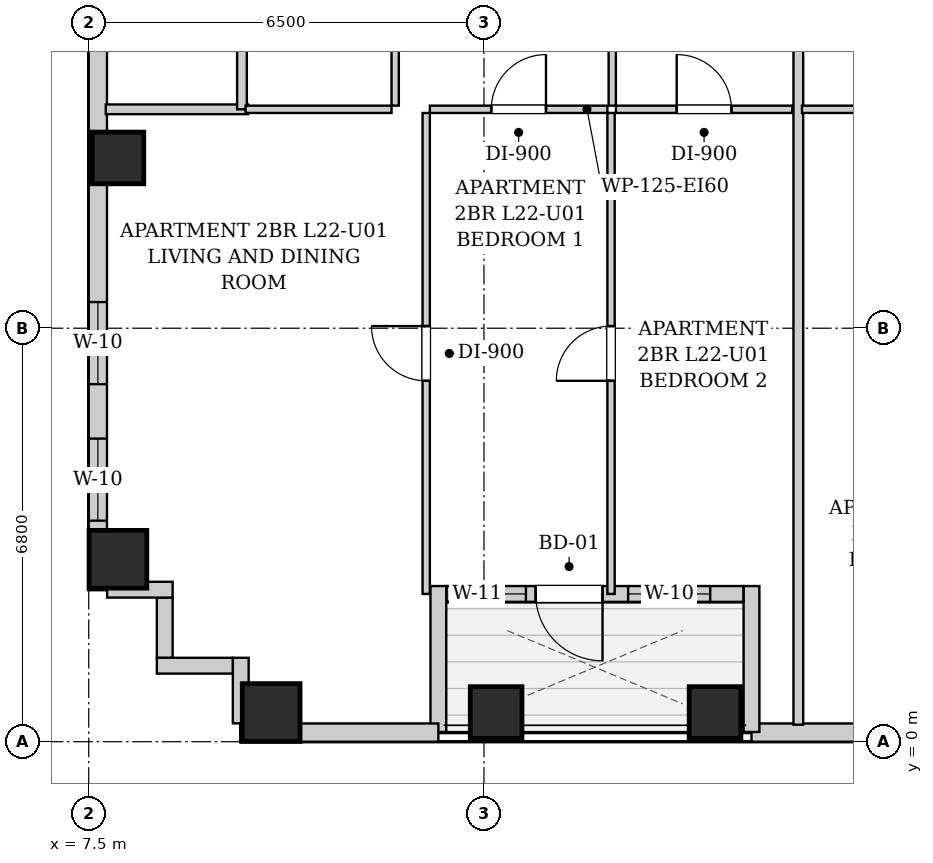
"""IFC4 building model, lengths in metres.
Left out: names, types, materials, properties, quantities, classifications, styles, units other than length and angle.
Written with IfcOpenShell. Run it as: python <this file> out.ifc"""

import sys

from ifc_helpers import new_model, si_unit, direction, frame, frame_2d, origin, origin_2d, place, context, subcontext, project, spatial, rectangle, extrude, element, fill, save


model = new_model("IFC4")
c1 = context("Model", 3, precision=1e-05, world=origin(), true_north=direction((0.0, 1.0)))
c2 = subcontext(c1, "Body", "Model", "MODEL_VIEW")
j1 = project(units=[si_unit("LENGTHUNIT", "METRE"), si_unit("PLANEANGLEUNIT", "RADIAN")], contexts=[c1])
p1 = place(None, origin())
s1 = spatial("IfcSite", under=j1, at=p1, CompositionType="ELEMENT")
p2 = place(p1, origin())
s2 = spatial("IfcBuilding", under=s1, at=p2, CompositionType="ELEMENT")
p3 = place(p2, frame((0.0, 0.0, 81.5)))
s3 = spatial("IfcBuildingStorey", under=s2, at=p3, CompositionType="ELEMENT", Elevation=81.5)
p4 = place(p3, frame((10.5, 0.48, 0.0), z_axis=(0.0, 0.0, 1.0), x_axis=(1.0, 0.0, 0.0)))
e1 = element("IfcColumn", 1, at=p4, inside=s3, PredefinedType="COLUMN", context=c2, shape_type="SweptSolid", body=[
    extrude(rectangle(XDim=0.95, YDim=0.95, at=origin_2d()), origin(), (0.0, 0.0, 1.0), 3.2),
])
for number, where, z_axis, x_axis in (
    (2, (14.2, 0.48, 0.0), (0.0, 0.0, 1.0), (1.0, 0.0, 0.0)),
    (3, (17.8, 0.48, 0.0), (0.0, 0.0, 1.0), (1.0, 0.0, 0.0)),
):
    element("IfcColumn", number, at=place(p3, frame(where, z_axis=z_axis, x_axis=x_axis)), inside=s3, PredefinedType="COLUMN", context=c2, shape_type="SweptSolid", body=[
        extrude(rectangle(XDim=0.85, YDim=0.85, at=origin_2d()), origin(), (0.0, 0.0, 1.0), 3.2),
    ])
p5 = place(p3, frame((7.98, 3.0, 0.0), z_axis=(0.0, 0.0, 1.0), x_axis=(1.0, 0.0, 0.0)))
e4 = element("IfcColumn", 4, at=p5, inside=s3, PredefinedType="COLUMN", context=c2, shape_type="SweptSolid", body=[
    extrude(rectangle(XDim=0.95, YDim=0.95, at=origin_2d()), origin(), (0.0, 0.0, 1.0), 3.2),
])
p6 = place(p3, frame((7.98, 9.6, 0.0), z_axis=(0.0, 0.0, 1.0), x_axis=(1.0, 0.0, 0.0)))
e5 = element("IfcColumn", 5, at=p6, inside=s3, PredefinedType="COLUMN", context=c2, shape_type="SweptSolid", body=[
    extrude(rectangle(XDim=0.85, YDim=0.85, at=origin_2d()), origin(), (0.0, 0.0, 1.0), 3.2),
])
p7 = place(p3, frame((40.9, 0.15, 0.0), z_axis=(0.0, 0.0, 1.0), x_axis=(-1.0, 0.0, 0.0)))
e6 = element("IfcWall", 6, at=p7, inside=s3, PredefinedType="SOLIDWALL", context=c2, shape_type="SweptSolid", body=[
    extrude(rectangle(XDim=22.5, YDim=0.3, at=frame_2d((11.25, 0.0))), origin(), (0.0, 0.0, 1.0), 2.94),
])
p8 = place(p7, frame((19.425, 0.0, 0.55)))
e7 = element("IfcOpeningElement", 7, at=p8, cuts=e6, PredefinedType="OPENING", context=c2, shape_type="SweptSolid", body=[
    extrude(rectangle(XDim=1.35, YDim=1.2, at=frame_2d((0.675, 0.6))), frame((0.0, 0.16, 0.0), z_axis=(0.0, -1.0, 0.0), x_axis=(1.0, 0.0, 0.0)), (0.0, 0.0, 1.0), 0.32),
])
p9 = place(p7, frame((12.55, 0.0, 0.55)))
e8 = element("IfcOpeningElement", 8, at=p9, cuts=e6, PredefinedType="OPENING", context=c2, shape_type="SweptSolid", body=[
    extrude(rectangle(XDim=0.85, YDim=1.2, at=frame_2d((0.425, 0.6))), frame((0.0, 0.16, 0.0), z_axis=(0.0, -1.0, 0.0), x_axis=(1.0, 0.0, 0.0)), (0.0, 0.0, 1.0), 0.32),
])
p10 = place(p7, frame((9.75, 0.0, 0.55)))
e9 = element("IfcOpeningElement", 9, at=p10, cuts=e6, PredefinedType="OPENING", context=c2, shape_type="SweptSolid", body=[
    extrude(rectangle(XDim=1.35, YDim=1.2, at=frame_2d((0.675, 0.6))), frame((0.0, 0.16, 0.0), z_axis=(0.0, -1.0, 0.0), x_axis=(1.0, 0.0, 0.0)), (0.0, 0.0, 1.0), 0.32),
])
p11 = place(p7, frame((6.265, 0.0, 0.55)))
e10 = element("IfcOpeningElement", 10, at=p11, cuts=e6, PredefinedType="OPENING", context=c2, shape_type="SweptSolid", body=[
    extrude(rectangle(XDim=0.85, YDim=1.2, at=frame_2d((0.425, 0.6))), frame((0.0, 0.16, 0.0), z_axis=(0.0, -1.0, 0.0), x_axis=(1.0, 0.0, 0.0)), (0.0, 0.0, 1.0), 0.32),
])
p12 = place(p7, frame((2.325, 0.0, 0.55)))
e11 = element("IfcOpeningElement", 11, at=p12, cuts=e6, PredefinedType="OPENING", context=c2, shape_type="SweptSolid", body=[
    extrude(rectangle(XDim=1.35, YDim=1.2, at=frame_2d((0.675, 0.6))), frame((0.0, 0.16, 0.0), z_axis=(0.0, -1.0, 0.0), x_axis=(1.0, 0.0, 0.0)), (0.0, 0.0, 1.0), 0.32),
])
p13 = place(p3, frame((18.4, 0.16, 0.0), z_axis=(0.0, 0.0, 1.0), x_axis=(0.0, 1.0, 0.0)))
e12 = element("IfcWall", 12, at=p13, inside=s3, PredefinedType="SOLIDWALL", context=c2, shape_type="SweptSolid", body=[
    extrude(rectangle(XDim=2.4, YDim=0.26, at=frame_2d((1.2, 0.0))), origin(), (0.0, 0.0, 1.0), 2.94),
])
p14 = place(p3, frame((18.266, 2.43, 0.0), z_axis=(0.0, 0.0, 1.0), x_axis=(-1.0, 0.0, 0.0)))
e13 = element("IfcWall", 13, at=p14, inside=s3, PredefinedType="SOLIDWALL", context=c2, shape_type="SweptSolid", body=[
    extrude(rectangle(XDim=4.882, YDim=0.26, at=frame_2d((2.441, 0.0))), origin(), (0.0, 0.0, 1.0), 2.94),
])
p15 = place(p14, frame((2.316, 0.0, 0.0)))
e14 = element("IfcOpeningElement", 14, at=p15, cuts=e13, PredefinedType="OPENING", context=c2, shape_type="SweptSolid", body=[
    extrude(rectangle(XDim=1.1, YDim=2.0, at=frame_2d((0.55, 1.0))), frame((0.0, 0.14, 0.0), z_axis=(0.0, -1.0, 0.0), x_axis=(1.0, 0.0, 0.0)), (0.0, 0.0, 1.0), 0.28),
])
p16 = place(p14, frame((3.576, 0.0, 0.55)))
e15 = element("IfcOpeningElement", 15, at=p16, cuts=e13, PredefinedType="OPENING", context=c2, shape_type="SweptSolid", body=[
    extrude(rectangle(XDim=0.85, YDim=1.2, at=frame_2d((0.425, 0.6))), frame((0.0, 0.14, 0.0), z_axis=(0.0, -1.0, 0.0), x_axis=(1.0, 0.0, 0.0)), (0.0, 0.0, 1.0), 0.28),
])
p17 = place(p14, frame((0.545, 0.0, 0.55)))
e16 = element("IfcOpeningElement", 16, at=p17, cuts=e13, PredefinedType="OPENING", context=c2, shape_type="SweptSolid", body=[
    extrude(rectangle(XDim=1.35, YDim=1.2, at=frame_2d((0.675, 0.6))), frame((0.0, 0.14, 0.0), z_axis=(0.0, -1.0, 0.0), x_axis=(1.0, 0.0, 0.0)), (0.0, 0.0, 1.0), 0.28),
])
p18 = place(p3, frame((13.25, 2.56, 0.0), z_axis=(0.0, 0.0, 1.0), x_axis=(0.0, -1.0, 0.0)))
e17 = element("IfcWall", 17, at=p18, inside=s3, PredefinedType="SOLIDWALL", context=c2, shape_type="SweptSolid", body=[
    extrude(rectangle(XDim=2.4, YDim=0.26, at=frame_2d((1.2, 0.0))), origin(), (0.0, 0.0, 1.0), 2.94),
])
p19 = place(p3, frame((13.25, 0.15, 0.0), z_axis=(0.0, 0.0, 1.0), x_axis=(-1.0, 0.0, 0.0)))
e18 = element("IfcWall", 18, at=p19, inside=s3, PredefinedType="SOLIDWALL", context=c2, shape_type="SweptSolid", body=[
    extrude(rectangle(XDim=3.25, YDim=0.3, at=frame_2d((1.625, 0.0))), origin(), (0.0, 0.0, 1.0), 2.94),
])
p20 = place(p3, frame((7.65, 2.5, 0.0), z_axis=(0.0, 0.0, 1.0), x_axis=(0.0, 1.0, 0.0)))
e19 = element("IfcWall", 19, at=p20, inside=s3, PredefinedType="SOLIDWALL", context=c2, shape_type="SweptSolid", body=[
    extrude(rectangle(XDim=38.3, YDim=0.3, at=frame_2d((19.15, 0.0))), origin(), (0.0, 0.0, 1.0), 2.94),
])
p21 = place(p20, frame((3.38, 0.0, 0.55)))
e20 = element("IfcOpeningElement", 20, at=p21, cuts=e19, PredefinedType="OPENING", context=c2, shape_type="SweptSolid", body=[
    extrude(rectangle(XDim=1.35, YDim=1.2, at=frame_2d((0.675, 0.6))), frame((0.0, 0.16, 0.0), z_axis=(0.0, -1.0, 0.0), x_axis=(1.0, 0.0, 0.0)), (0.0, 0.0, 1.0), 0.32),
])
p22 = place(p20, frame((1.135, 0.0, 0.55)))
e21 = element("IfcOpeningElement", 21, at=p22, cuts=e19, PredefinedType="OPENING", context=c2, shape_type="SweptSolid", body=[
    extrude(rectangle(XDim=1.35, YDim=1.2, at=frame_2d((0.675, 0.6))), frame((0.0, 0.16, 0.0), z_axis=(0.0, -1.0, 0.0), x_axis=(1.0, 0.0, 0.0)), (0.0, 0.0, 1.0), 0.32),
])
p23 = place(p20, frame((33.946, 0.0, 0.55)))
e22 = element("IfcOpeningElement", 22, at=p23, cuts=e19, PredefinedType="OPENING", context=c2, shape_type="SweptSolid", body=[
    extrude(rectangle(XDim=1.35, YDim=1.2, at=frame_2d((0.675, 0.6))), frame((0.0, 0.16, 0.0), z_axis=(0.0, -1.0, 0.0), x_axis=(1.0, 0.0, 0.0)), (0.0, 0.0, 1.0), 0.32),
])
p24 = place(p20, frame((32.085, 0.0, 0.55)))
e23 = element("IfcOpeningElement", 23, at=p24, cuts=e19, PredefinedType="OPENING", context=c2, shape_type="SweptSolid", body=[
    extrude(rectangle(XDim=1.35, YDim=1.2, at=frame_2d((0.675, 0.6))), frame((0.0, 0.16, 0.0), z_axis=(0.0, -1.0, 0.0), x_axis=(1.0, 0.0, 0.0)), (0.0, 0.0, 1.0), 0.32),
])
p25 = place(p20, frame((14.194, 0.0, 0.55)))
e24 = element("IfcOpeningElement", 24, at=p25, cuts=e19, PredefinedType="OPENING", context=c2, shape_type="SweptSolid", body=[
    extrude(rectangle(XDim=1.35, YDim=1.2, at=frame_2d((0.675, 0.6))), frame((0.0, 0.16, 0.0), z_axis=(0.0, -1.0, 0.0), x_axis=(1.0, 0.0, 0.0)), (0.0, 0.0, 1.0), 0.32),
])
p26 = place(p20, frame((23.582, 0.0, 0.55)))
e25 = element("IfcOpeningElement", 25, at=p26, cuts=e19, PredefinedType="OPENING", context=c2, shape_type="SweptSolid", body=[
    extrude(rectangle(XDim=1.35, YDim=1.2, at=frame_2d((0.675, 0.6))), frame((0.0, 0.16, 0.0), z_axis=(0.0, -1.0, 0.0), x_axis=(1.0, 0.0, 0.0)), (0.0, 0.0, 1.0), 0.32),
])
p27 = place(p3, frame((10.0, 0.302, 0.0), z_axis=(0.0, 0.0, 1.0), x_axis=(0.0, 1.0, 0.0)))
e26 = element("IfcWall", 26, at=p27, inside=s3, PredefinedType="SOLIDWALL", context=c2, shape_type="SweptSolid", body=[
    extrude(rectangle(XDim=1.078, YDim=0.26, at=frame_2d((0.539, 0.0))), origin(), (0.0, 0.0, 1.0), 2.94),
])
p28 = place(p3, frame((9.868, 1.25, 0.0), z_axis=(0.0, 0.0, 1.0), x_axis=(-1.0, 0.0, 0.0)))
e27 = element("IfcWall", 27, at=p28, inside=s3, PredefinedType="SOLIDWALL", context=c2, shape_type="SweptSolid", body=[
    extrude(rectangle(XDim=1.248, YDim=0.26, at=frame_2d((0.624, 0.0))), origin(), (0.0, 0.0, 1.0), 2.94),
])
p29 = place(p3, frame((8.75, 1.382, 0.0), z_axis=(0.0, 0.0, 1.0), x_axis=(0.0, 1.0, 0.0)))
e28 = element("IfcWall", 28, at=p29, inside=s3, PredefinedType="SOLIDWALL", context=c2, shape_type="SweptSolid", body=[
    extrude(rectangle(XDim=0.986, YDim=0.26, at=frame_2d((0.493, 0.0))), origin(), (0.0, 0.0, 1.0), 2.94),
])
p30 = place(p3, frame((8.88, 2.5, 0.0), z_axis=(0.0, 0.0, 1.0), x_axis=(-1.0, 0.0, 0.0)))
e29 = element("IfcWall", 29, at=p30, inside=s3, PredefinedType="SOLIDWALL", context=c2, shape_type="SweptSolid", body=[
    extrude(rectangle(XDim=1.078, YDim=0.26, at=frame_2d((0.539, 0.0))), origin(), (0.0, 0.0, 1.0), 2.94),
])
p31 = place(p3, frame((7.78, 10.4, 0.0), z_axis=(0.0, 0.0, 1.0), x_axis=(1.0, 0.0, 0.0)))
e30 = element("IfcWall", 30, at=p31, inside=s3, PredefinedType="PARTITIONING", context=c2, shape_type="SweptSolid", body=[
    extrude(rectangle(XDim=2.34, YDim=0.16, at=frame_2d((1.17, 0.0))), origin(), (0.0, 0.0, 1.0), 2.94),
])
p32 = place(p3, frame((10.02, 10.4, 0.0), z_axis=(0.0, 0.0, 1.0), x_axis=(0.0, 1.0, 0.0)))
e31 = element("IfcWall", 31, at=p32, inside=s3, PredefinedType="PARTITIONING", context=c2, shape_type="SweptSolid", body=[
    extrude(rectangle(XDim=2.91, YDim=0.16, at=frame_2d((1.455, 0.0))), origin(), (0.0, 0.0, 1.0), 2.94),
])
p33 = place(p3, frame((12.54, 10.46, 0.0), z_axis=(0.0, 0.0, 1.0), x_axis=(0.0, 1.0, 0.0)))
e32 = element("IfcWall", 32, at=p33, inside=s3, PredefinedType="PARTITIONING", context=c2, shape_type="SweptSolid", body=[
    extrude(rectangle(XDim=2.85, YDim=0.12, at=frame_2d((1.425, 0.0))), origin(), (0.0, 0.0, 1.0), 2.94),
])
p34 = place(p33, frame((0.995, 0.0, 0.0)))
e33 = element("IfcOpeningElement", 33, at=p34, cuts=e32, PredefinedType="OPENING", context=c2, shape_type="SweptSolid", body=[
    extrude(rectangle(XDim=0.86, YDim=2.05, at=frame_2d((0.43, 1.025))), frame((0.0, 0.07, 0.0), z_axis=(0.0, -1.0, 0.0), x_axis=(1.0, 0.0, 0.0)), (0.0, 0.0, 1.0), 0.14),
])
p35 = place(p3, frame((10.08, 10.4, 0.0), z_axis=(0.0, 0.0, 1.0), x_axis=(1.0, 0.0, 0.0)))
e34 = element("IfcWall", 34, at=p35, inside=s3, PredefinedType="PARTITIONING", context=c2, shape_type="SweptSolid", body=[
    extrude(rectangle(XDim=2.4, YDim=0.12, at=frame_2d((1.2, 0.0))), origin(), (0.0, 0.0, 1.0), 2.94),
])
p36 = place(p3, frame((16.11, 10.46, 0.0), z_axis=(0.0, 0.0, 1.0), x_axis=(0.0, 1.0, 0.0)))
e35 = element("IfcWall", 35, at=p36, inside=s3, PredefinedType="PARTITIONING", context=c2, shape_type="SweptSolid", body=[
    extrude(rectangle(XDim=2.85, YDim=0.12, at=frame_2d((1.425, 0.0))), origin(), (0.0, 0.0, 1.0), 2.94),
])
p37 = place(p36, frame((0.975, 0.0, 0.0)))
e36 = element("IfcOpeningElement", 36, at=p37, cuts=e35, PredefinedType="OPENING", context=c2, shape_type="SweptSolid", body=[
    extrude(rectangle(XDim=0.9, YDim=2.05, at=frame_2d((0.45, 1.025))), frame((0.0, 0.07, 0.0), z_axis=(0.0, -1.0, 0.0), x_axis=(1.0, 0.0, 0.0)), (0.0, 0.0, 1.0), 0.14),
])
p38 = place(p3, frame((13.11, 10.4, 0.0), z_axis=(0.0, 0.0, 1.0), x_axis=(1.0, 0.0, 0.0)))
e37 = element("IfcWall", 37, at=p38, inside=s3, PredefinedType="PARTITIONING", context=c2, shape_type="SweptSolid", body=[
    extrude(rectangle(XDim=2.92, YDim=0.12, at=frame_2d((1.46, 0.0))), origin(), (0.0, 0.0, 1.0), 2.94),
])
p39 = place(p38, frame((1.01, 0.0, 0.0)))
e38 = element("IfcOpeningElement", 38, at=p39, cuts=e37, PredefinedType="OPENING", context=c2, shape_type="SweptSolid", body=[
    extrude(rectangle(XDim=0.9, YDim=2.05, at=frame_2d((0.45, 1.025))), frame((0.0, 0.07, 0.0), z_axis=(0.0, -1.0, 0.0), x_axis=(1.0, 0.0, 0.0)), (0.0, 0.0, 1.0), 0.14),
])
p40 = place(p3, frame((16.17, 10.4, 0.0), z_axis=(0.0, 0.0, 1.0), x_axis=(1.0, 0.0, 0.0)))
e39 = element("IfcWall", 39, at=p40, inside=s3, PredefinedType="PARTITIONING", context=c2, shape_type="SweptSolid", body=[
    extrude(rectangle(XDim=2.9, YDim=0.12, at=frame_2d((1.45, 0.0))), origin(), (0.0, 0.0, 1.0), 2.94),
])
p41 = place(p40, frame((1.0, 0.0, 0.0)))
e40 = element("IfcOpeningElement", 40, at=p41, cuts=e39, PredefinedType="OPENING", context=c2, shape_type="SweptSolid", body=[
    extrude(rectangle(XDim=0.9, YDim=2.05, at=frame_2d((0.45, 1.025))), frame((0.0, 0.07, 0.0), z_axis=(0.0, -1.0, 0.0), x_axis=(1.0, 0.0, 0.0)), (0.0, 0.0, 1.0), 0.14),
])
p42 = place(p3, frame((13.05, 2.43, 0.0), z_axis=(0.0, 0.0, 1.0), x_axis=(0.0, 1.0, 0.0)))
e41 = element("IfcWall", 41, at=p42, inside=s3, PredefinedType="PARTITIONING", context=c2, shape_type="SweptSolid", body=[
    extrude(rectangle(XDim=7.91, YDim=0.12, at=frame_2d((3.955, 0.0))), origin(), (0.0, 0.0, 1.0), 2.94),
])
p43 = place(p42, frame((3.505, 0.0, 0.0)))
e42 = element("IfcOpeningElement", 42, at=p43, cuts=e41, PredefinedType="OPENING", context=c2, shape_type="SweptSolid", body=[
    extrude(rectangle(XDim=0.9, YDim=2.05, at=frame_2d((0.45, 1.025))), frame((0.0, 0.07, 0.0), z_axis=(0.0, -1.0, 0.0), x_axis=(1.0, 0.0, 0.0)), (0.0, 0.0, 1.0), 0.14),
])
p44 = place(p3, frame((16.09, 2.43, 0.0), z_axis=(0.0, 0.0, 1.0), x_axis=(0.0, 1.0, 0.0)))
e43 = element("IfcWall", 43, at=p44, inside=s3, PredefinedType="PARTITIONING", context=c2, shape_type="SweptSolid", body=[
    extrude(rectangle(XDim=7.91, YDim=0.12, at=frame_2d((3.955, 0.0))), origin(), (0.0, 0.0, 1.0), 2.94),
])
p45 = place(p44, frame((3.505, 0.0, 0.0)))
e44 = element("IfcOpeningElement", 44, at=p45, cuts=e43, PredefinedType="OPENING", context=c2, shape_type="SweptSolid", body=[
    extrude(rectangle(XDim=0.9, YDim=2.05, at=frame_2d((0.45, 1.025))), frame((0.0, 0.07, 0.0), z_axis=(0.0, -1.0, 0.0), x_axis=(1.0, 0.0, 0.0)), (0.0, 0.0, 1.0), 0.14),
])
p46 = place(p3, frame((19.17, 0.28, 0.0), z_axis=(0.0, 0.0, 1.0), x_axis=(0.0, 1.0, 0.0)))
e45 = element("IfcWall", 45, at=p46, inside=s3, PredefinedType="PARTITIONING", context=c2, shape_type="SweptSolid", body=[
    extrude(rectangle(XDim=13.03, YDim=0.16, at=frame_2d((6.515, 0.0))), origin(), (0.0, 0.0, 1.0), 2.94),
])
p47 = place(p3, frame((19.23, 10.4, 0.0), z_axis=(0.0, 0.0, 1.0), x_axis=(1.0, 0.0, 0.0)))
e46 = element("IfcWall", 46, at=p47, inside=s3, PredefinedType="PARTITIONING", context=c2, shape_type="SweptSolid", body=[
    extrude(rectangle(XDim=2.4, YDim=0.12, at=frame_2d((1.2, 0.0))), origin(), (0.0, 0.0, 1.0), 2.94),
])
p48 = place(p39, origin())
e47 = element("IfcDoor", 47, at=p48, inside=s3, OperationType="SINGLE_SWING_RIGHT", PredefinedType="DOOR", context=c2, shape_type="SweptSolid", body=[
    extrude(rectangle(XDim=0.9, YDim=2.05, at=frame_2d((0.45, 1.025))), frame((0.0, 0.025, 0.0), z_axis=(0.0, -1.0, 0.0), x_axis=(1.0, 0.0, 0.0)), (0.0, 0.0, 1.0), 0.05),
])
fill(e38, e47)
p49 = place(p41, origin())
e48 = element("IfcDoor", 48, at=p49, inside=s3, OperationType="SINGLE_SWING_LEFT", PredefinedType="DOOR", context=c2, shape_type="SweptSolid", body=[
    extrude(rectangle(XDim=0.9, YDim=2.05, at=frame_2d((0.45, 1.025))), frame((0.0, 0.025, 0.0), z_axis=(0.0, -1.0, 0.0), x_axis=(1.0, 0.0, 0.0)), (0.0, 0.0, 1.0), 0.05),
])
fill(e40, e48)
p50 = place(p43, origin())
e49 = element("IfcDoor", 49, at=p50, inside=s3, OperationType="SINGLE_SWING_RIGHT", PredefinedType="DOOR", context=c2, shape_type="SweptSolid", body=[
    extrude(rectangle(XDim=0.9, YDim=2.05, at=frame_2d((0.45, 1.025))), frame((0.0, 0.025, 0.0), z_axis=(0.0, -1.0, 0.0), x_axis=(1.0, 0.0, 0.0)), (0.0, 0.0, 1.0), 0.05),
])
fill(e42, e49)
p51 = place(p45, origin())
e50 = element("IfcDoor", 50, at=p51, inside=s3, OperationType="SINGLE_SWING_LEFT", PredefinedType="DOOR", context=c2, shape_type="SweptSolid", body=[
    extrude(rectangle(XDim=0.9, YDim=2.05, at=frame_2d((0.45, 1.025))), frame((0.0, 0.025, 0.0), z_axis=(0.0, -1.0, 0.0), x_axis=(1.0, 0.0, 0.0)), (0.0, 0.0, 1.0), 0.05),
])
fill(e44, e50)
p52 = place(p15, origin())
e51 = element("IfcDoor", 51, at=p52, inside=s3, OperationType="SINGLE_SWING_LEFT", PredefinedType="DOOR", context=c2, shape_type="SweptSolid", body=[
    extrude(rectangle(XDim=1.1, YDim=2.0, at=frame_2d((0.55, 1.0))), frame((0.0, 0.025, 0.0), z_axis=(0.0, -1.0, 0.0), x_axis=(1.0, 0.0, 0.0)), (0.0, 0.0, 1.0), 0.05),
])
fill(e14, e51)
p53 = place(p21, origin())
e52 = element("IfcWindow", 52, at=p53, inside=s3, PartitioningType="SINGLE_PANEL", PredefinedType="WINDOW", context=c2, shape_type="SweptSolid", body=[
    extrude(rectangle(XDim=1.35, YDim=1.2, at=frame_2d((0.675, 0.6))), frame((0.0, 0.03, 0.0), z_axis=(0.0, -1.0, 0.0), x_axis=(1.0, 0.0, 0.0)), (0.0, 0.0, 1.0), 0.06),
])
fill(e20, e52)
p54 = place(p22, origin())
e53 = element("IfcWindow", 53, at=p54, inside=s3, PartitioningType="SINGLE_PANEL", PredefinedType="WINDOW", context=c2, shape_type="SweptSolid", body=[
    extrude(rectangle(XDim=1.35, YDim=1.2, at=frame_2d((0.675, 0.6))), frame((0.0, 0.03, 0.0), z_axis=(0.0, -1.0, 0.0), x_axis=(1.0, 0.0, 0.0)), (0.0, 0.0, 1.0), 0.06),
])
fill(e21, e53)
p55 = place(p16, origin())
e54 = element("IfcWindow", 54, at=p55, inside=s3, PartitioningType="SINGLE_PANEL", PredefinedType="WINDOW", context=c2, shape_type="SweptSolid", body=[
    extrude(rectangle(XDim=0.85, YDim=1.2, at=frame_2d((0.425, 0.6))), frame((0.0, 0.03, 0.0), z_axis=(0.0, -1.0, 0.0), x_axis=(1.0, 0.0, 0.0)), (0.0, 0.0, 1.0), 0.06),
])
fill(e15, e54)
p56 = place(p17, origin())
e55 = element("IfcWindow", 55, at=p56, inside=s3, PartitioningType="SINGLE_PANEL", PredefinedType="WINDOW", context=c2, shape_type="SweptSolid", body=[
    extrude(rectangle(XDim=1.35, YDim=1.2, at=frame_2d((0.675, 0.6))), frame((0.0, 0.03, 0.0), z_axis=(0.0, -1.0, 0.0), x_axis=(1.0, 0.0, 0.0)), (0.0, 0.0, 1.0), 0.06),
])
fill(e16, e55)
save(model, sys.argv[1])
